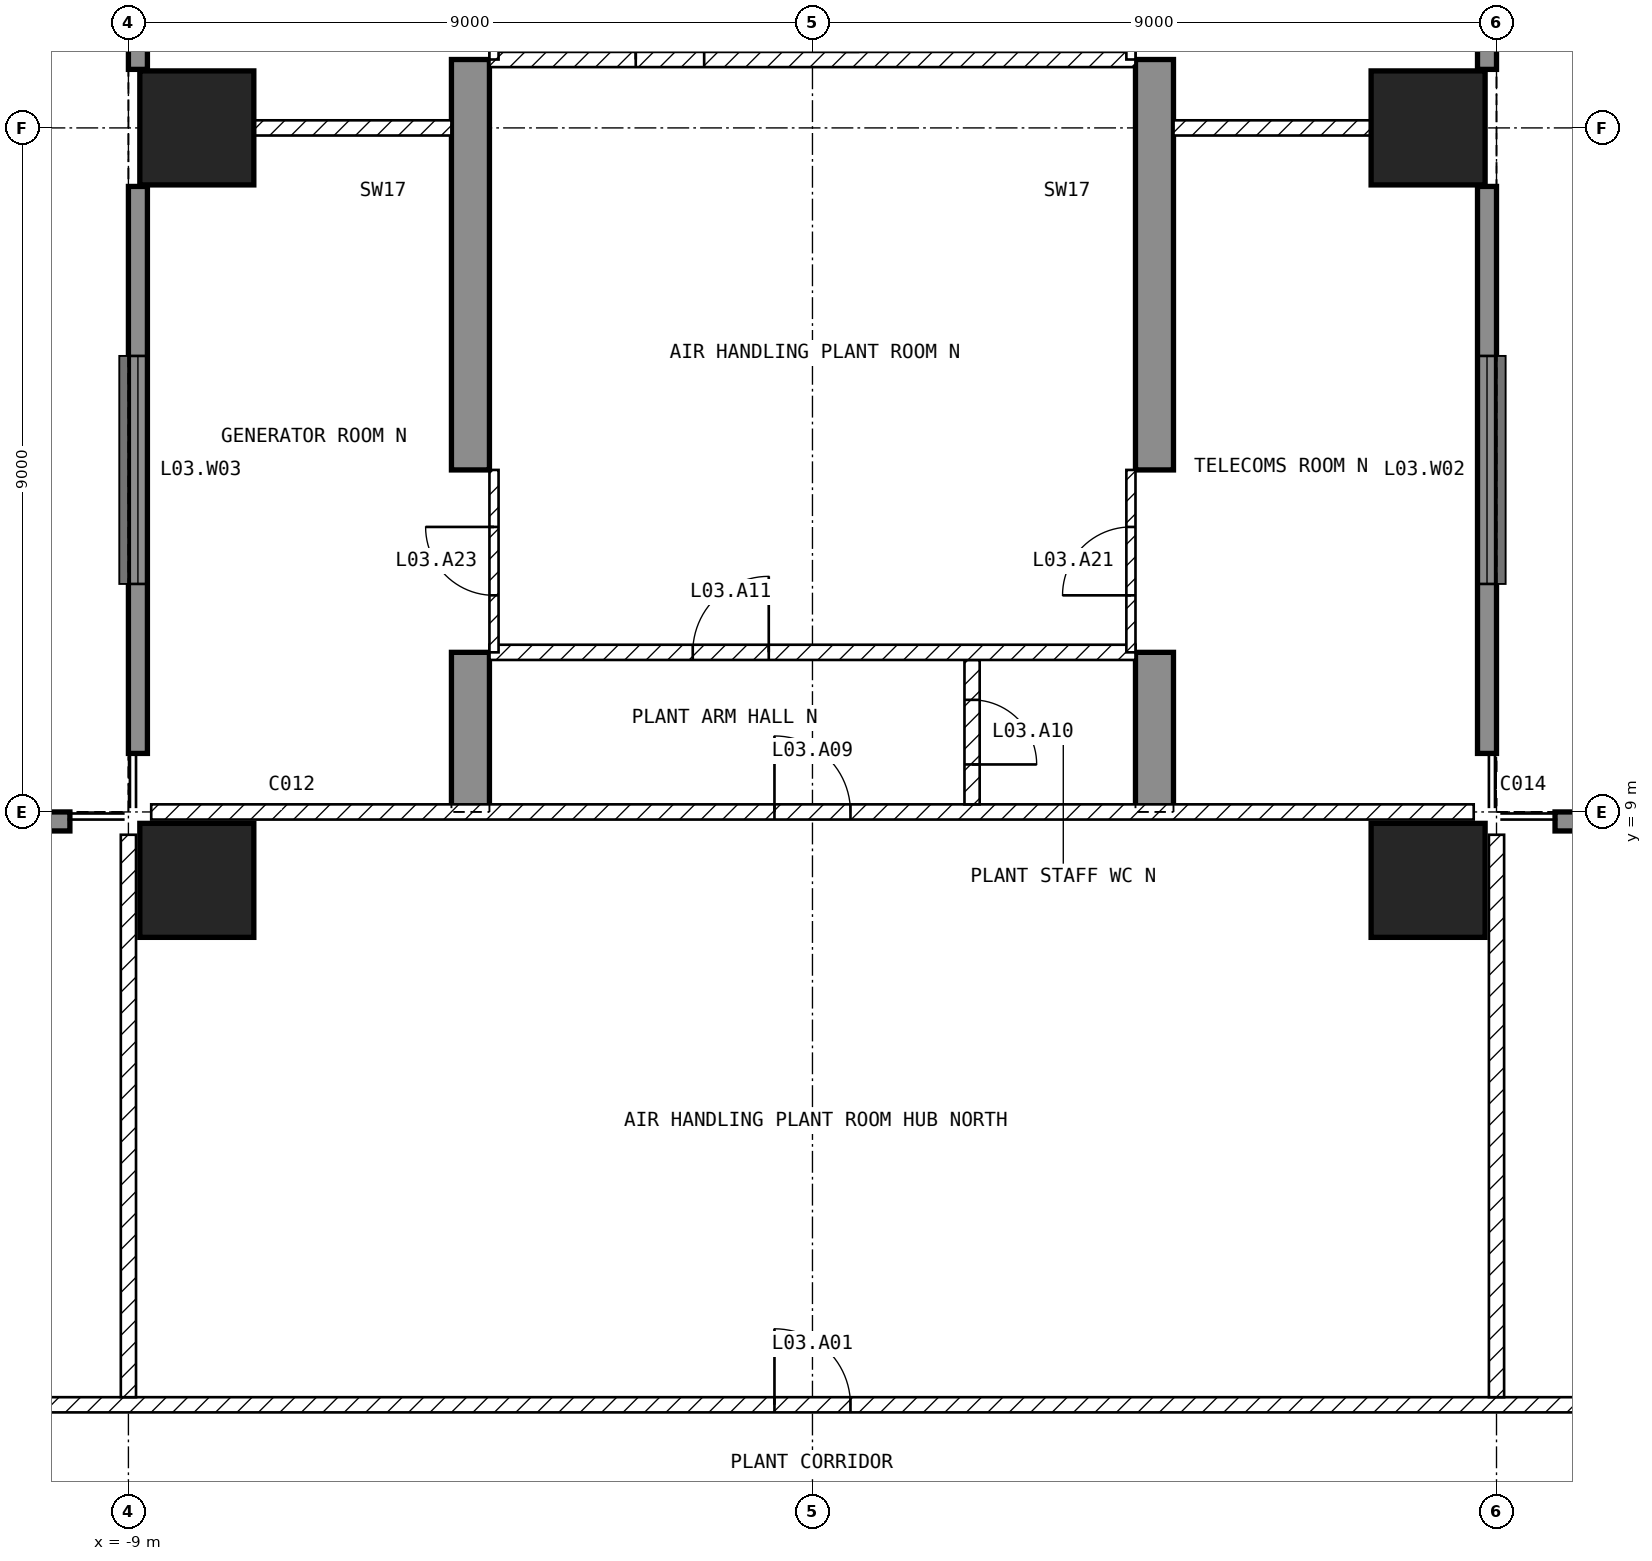
"""IFC4 building model, lengths in metres.
Left out: names, types, materials, properties, quantities, classifications, styles, units other than length and angle.
Written with IfcOpenShell. Run it as: python <this file> out.ifc"""

import sys

from ifc_helpers import new_model, si_unit, direction, frame, frame_2d, origin, origin_2d, place, context, subcontext, project, spatial, polyline, rectangle, outline, extrude, element, fill, save


model = new_model("IFC4")
c1 = context("Model", 3, precision=1e-05, world=origin(), true_north=direction((0.0, 1.0)))
c2 = subcontext(c1, "Body", "Model", "MODEL_VIEW")
j1 = project(units=[si_unit("LENGTHUNIT", "METRE"), si_unit("PLANEANGLEUNIT", "RADIAN")], contexts=[c1])
p1 = place(None, origin())
s1 = spatial("IfcSite", under=j1, at=p1, CompositionType="ELEMENT")
p2 = place(p1, origin())
s2 = spatial("IfcBuilding", under=s1, at=p2, CompositionType="ELEMENT")
p3 = place(p2, frame((0.0, 0.0, 27.0)))
s3 = spatial("IfcBuildingStorey", under=s2, at=p3, CompositionType="ELEMENT", Elevation=27.0)
for number, where, z_axis, x_axis in (
    (1, (-8.1, 8.1, -0.45), (0.0, 0.0, 1.0), (1.0, 0.0, 0.0)),
    (2, (-8.1, 18.0, -0.45), (0.0, 0.0, 1.0), (1.0, 0.0, 0.0)),
    (3, (8.1, 8.1, -0.45), (0.0, 0.0, 1.0), (1.0, 0.0, 0.0)),
    (4, (8.1, 18.0, -0.45), (0.0, 0.0, 1.0), (1.0, 0.0, 0.0)),
):
    element("IfcColumn", number, at=place(p3, frame(where, z_axis=z_axis, x_axis=x_axis)), inside=s3, PredefinedType="COLUMN", context=c2, shape_type="SweptSolid", body=[
        extrude(rectangle(XDim=1.5, YDim=1.5, at=origin_2d()), origin(), (0.0, 0.0, 1.0), 5.15),
    ])
for number, where, z_axis, x_axis in (
    (5, (-4.75, 9.0, -0.45), (1.0, 0.0, 0.0), (0.0, 1.0, 0.0)),
    (6, (4.25, 9.0, -0.45), (1.0, 0.0, 0.0), (0.0, 1.0, 0.0)),
):
    element("IfcWall", number, at=place(p3, frame(where, z_axis=z_axis, x_axis=x_axis)), inside=s3, PredefinedType="SHEAR", context=c2, shape_type="SweptSolid", body=[
        extrude(outline(polyline([(0.0, 0.0), (2.1, 0.0), (2.1, 2.85), (4.5, 2.85), (4.5, 0.0), (9.9, 0.0), (9.9, 2.85), (12.3, 2.85), (12.3, 0.0), (16.35, 0.0), (16.35, 5.15), (0.0, 5.15), (0.0, 0.0)])), origin(), (0.0, 0.0, 1.0), 0.5),
    ])
p4 = place(p3, frame((17.23, 8.875, 0.0), z_axis=(0.0, 0.0, 1.0), x_axis=(-1.0, 0.0, 0.0)))
e7 = element("IfcWall", 7, at=p4, inside=s3, PredefinedType="SOLIDWALL", context=c2, shape_type="SweptSolid", body=[
    extrude(rectangle(XDim=7.46, YDim=0.25, at=frame_2d((3.73, 0.0))), origin(), (0.0, 0.0, 1.0), 4.7),
])
p5 = place(p4, frame((2.23, 0.0, 1.0)))
e8 = element("IfcOpeningElement", 8, at=p5, cuts=e7, PredefinedType="OPENING", context=c2, shape_type="SweptSolid", body=[
    extrude(rectangle(XDim=3.0, YDim=2.4, at=frame_2d((1.5, 1.2))), frame((0.0, 0.135, 0.0), z_axis=(0.0, -1.0, 0.0), x_axis=(1.0, 0.0, 0.0)), (0.0, 0.0, 1.0), 0.27),
])
p6 = place(p3, frame((8.875, 9.77, 0.0), z_axis=(0.0, 0.0, 1.0), x_axis=(0.0, 1.0, 0.0)))
e9 = element("IfcWall", 9, at=p6, inside=s3, PredefinedType="SOLIDWALL", context=c2, shape_type="SweptSolid", body=[
    extrude(rectangle(XDim=7.46, YDim=0.25, at=frame_2d((3.73, 0.0))), origin(), (0.0, 0.0, 1.0), 4.7),
])
p7 = place(p6, frame((2.23, 0.0, 1.0)))
e10 = element("IfcOpeningElement", 10, at=p7, cuts=e9, PredefinedType="OPENING", context=c2, shape_type="SweptSolid", body=[
    extrude(rectangle(XDim=3.0, YDim=2.4, at=frame_2d((1.5, 1.2))), frame((0.0, 0.135, 0.0), z_axis=(0.0, -1.0, 0.0), x_axis=(1.0, 0.0, 0.0)), (0.0, 0.0, 1.0), 0.27),
])
for number, where, z_axis, x_axis in (
    (11, (8.875, 18.77, 0.0), (0.0, 0.0, 1.0), (0.0, 1.0, 0.0)),
    (12, (-8.875, 22.63, 0.0), (0.0, 0.0, 1.0), (0.0, -1.0, 0.0)),
):
    element("IfcWall", number, at=place(p3, frame(where, z_axis=z_axis, x_axis=x_axis)), inside=s3, PredefinedType="SOLIDWALL", context=c2, shape_type="SweptSolid", body=[
        extrude(rectangle(XDim=3.86, YDim=0.25, at=frame_2d((1.93, 0.0))), origin(), (0.0, 0.0, 1.0), 4.7),
    ])
p8 = place(p3, frame((-8.875, 17.23, 0.0), z_axis=(0.0, 0.0, 1.0), x_axis=(0.0, -1.0, 0.0)))
e13 = element("IfcWall", 13, at=p8, inside=s3, PredefinedType="SOLIDWALL", context=c2, shape_type="SweptSolid", body=[
    extrude(rectangle(XDim=7.46, YDim=0.25, at=frame_2d((3.73, 0.0))), origin(), (0.0, 0.0, 1.0), 4.7),
])
p9 = place(p8, frame((2.23, 0.0, 1.0)))
e14 = element("IfcOpeningElement", 14, at=p9, cuts=e13, PredefinedType="OPENING", context=c2, shape_type="SweptSolid", body=[
    extrude(rectangle(XDim=3.0, YDim=2.4, at=frame_2d((1.5, 1.2))), frame((0.0, 0.135, 0.0), z_axis=(0.0, -1.0, 0.0), x_axis=(1.0, 0.0, 0.0)), (0.0, 0.0, 1.0), 0.27),
])
p10 = place(p3, frame((-9.77, 8.875, 0.0), z_axis=(0.0, 0.0, 1.0), x_axis=(-1.0, 0.0, 0.0)))
e15 = element("IfcWall", 15, at=p10, inside=s3, PredefinedType="SOLIDWALL", context=c2, shape_type="SweptSolid", body=[
    extrude(rectangle(XDim=7.46, YDim=0.25, at=frame_2d((3.73, 0.0))), origin(), (0.0, 0.0, 1.0), 4.7),
])
p11 = place(p10, frame((2.23, 0.0, 1.0)))
e16 = element("IfcOpeningElement", 16, at=p11, cuts=e15, PredefinedType="OPENING", context=c2, shape_type="SweptSolid", body=[
    extrude(rectangle(XDim=3.0, YDim=2.4, at=frame_2d((1.5, 1.2))), frame((0.0, 0.135, 0.0), z_axis=(0.0, -1.0, 0.0), x_axis=(1.0, 0.0, 0.0)), (0.0, 0.0, 1.0), 0.27),
])
p12 = place(p3, frame((-21.6, 1.2, 0.0), z_axis=(0.0, 0.0, 1.0), x_axis=(1.0, 0.0, 0.0)))
e17 = element("IfcWall", 17, at=p12, inside=s3, PredefinedType="PARTITIONING", context=c2, shape_type="SweptSolid", body=[
    extrude(rectangle(XDim=43.2, YDim=0.2, at=frame_2d((21.6, 0.0))), origin(), (0.0, 0.0, 1.0), 4.7),
])
p13 = place(p12, frame((21.1, 0.0, 0.0)))
e18 = element("IfcOpeningElement", 18, at=p13, cuts=e17, PredefinedType="OPENING", context=c2, shape_type="SweptSolid", body=[
    extrude(rectangle(XDim=1.0, YDim=2.1, at=frame_2d((0.5, 1.05))), frame((0.0, 0.11, 0.0), z_axis=(0.0, -1.0, 0.0), x_axis=(1.0, 0.0, 0.0)), (0.0, 0.0, 1.0), 0.22),
])
p14 = place(p12, frame((36.4, 0.0, 0.0)))
e19 = element("IfcOpeningElement", 19, at=p14, cuts=e17, PredefinedType="OPENING", context=c2, shape_type="SweptSolid", body=[
    extrude(rectangle(XDim=1.0, YDim=2.1, at=frame_2d((0.5, 1.05))), frame((0.0, 0.11, 0.0), z_axis=(0.0, -1.0, 0.0), x_axis=(1.0, 0.0, 0.0)), (0.0, 0.0, 1.0), 0.22),
])
p15 = place(p12, frame((5.8, 0.0, 0.0)))
e20 = element("IfcOpeningElement", 20, at=p15, cuts=e17, PredefinedType="OPENING", context=c2, shape_type="SweptSolid", body=[
    extrude(rectangle(XDim=1.0, YDim=2.1, at=frame_2d((0.5, 1.05))), frame((0.0, 0.11, 0.0), z_axis=(0.0, -1.0, 0.0), x_axis=(1.0, 0.0, 0.0)), (0.0, 0.0, 1.0), 0.22),
])
for number, where, z_axis, x_axis in (
    (21, (9.0, 8.7, 0.0), (0.0, 0.0, 1.0), (0.0, -1.0, 0.0)),
    (22, (-9.0, 1.3, 0.0), (0.0, 0.0, 1.0), (0.0, 1.0, 0.0)),
):
    element("IfcWall", number, at=place(p3, frame(where, z_axis=z_axis, x_axis=x_axis)), inside=s3, PredefinedType="PARTITIONING", context=c2, shape_type="SweptSolid", body=[
        extrude(rectangle(XDim=7.4, YDim=0.2, at=frame_2d((3.7, 0.0))), origin(), (0.0, 0.0, 1.0), 4.7),
    ])
p16 = place(p3, frame((-8.7, 9.0, 0.0), z_axis=(0.0, 0.0, 1.0), x_axis=(1.0, 0.0, 0.0)))
e23 = element("IfcWall", 23, at=p16, inside=s3, PredefinedType="PARTITIONING", context=c2, shape_type="SweptSolid", body=[
    extrude(rectangle(XDim=17.4, YDim=0.2, at=frame_2d((8.7, 0.0))), origin(), (0.0, 0.0, 1.0), 4.7),
])
p17 = place(p16, frame((8.2, 0.0, 0.0)))
e24 = element("IfcOpeningElement", 24, at=p17, cuts=e23, PredefinedType="OPENING", context=c2, shape_type="SweptSolid", body=[
    extrude(rectangle(XDim=1.0, YDim=2.1, at=frame_2d((0.5, 1.05))), frame((0.0, 0.11, 0.0), z_axis=(0.0, -1.0, 0.0), x_axis=(1.0, 0.0, 0.0)), (0.0, 0.0, 1.0), 0.22),
])
p18 = place(p3, frame((2.1, 11.0, 0.0), z_axis=(0.0, 0.0, 1.0), x_axis=(0.0, -1.0, 0.0)))
e25 = element("IfcWall", 25, at=p18, inside=s3, PredefinedType="PARTITIONING", context=c2, shape_type="SweptSolid", body=[
    extrude(rectangle(XDim=1.9, YDim=0.2, at=frame_2d((0.95, 0.0))), origin(), (0.0, 0.0, 1.0), 4.7),
])
p19 = place(p18, frame((0.525, 0.0, 0.0)))
e26 = element("IfcOpeningElement", 26, at=p19, cuts=e25, PredefinedType="OPENING", context=c2, shape_type="SweptSolid", body=[
    extrude(rectangle(XDim=0.85, YDim=2.1, at=frame_2d((0.425, 1.05))), frame((0.0, 0.11, 0.0), z_axis=(0.0, -1.0, 0.0), x_axis=(1.0, 0.0, 0.0)), (0.0, 0.0, 1.0), 0.22),
])
p20 = place(p3, frame((-4.25, 11.1, 0.0), z_axis=(0.0, 0.0, 1.0), x_axis=(1.0, 0.0, 0.0)))
e27 = element("IfcWall", 27, at=p20, inside=s3, PredefinedType="PARTITIONING", context=c2, shape_type="SweptSolid", body=[
    extrude(rectangle(XDim=8.5, YDim=0.2, at=frame_2d((4.25, 0.0))), origin(), (0.0, 0.0, 1.0), 4.7),
])
p21 = place(p20, frame((2.675, 0.0, 0.0)))
e28 = element("IfcOpeningElement", 28, at=p21, cuts=e27, PredefinedType="OPENING", context=c2, shape_type="SweptSolid", body=[
    extrude(rectangle(XDim=1.0, YDim=2.1, at=frame_2d((0.5, 1.05))), frame((0.0, 0.11, 0.0), z_axis=(0.0, -1.0, 0.0), x_axis=(1.0, 0.0, 0.0)), (0.0, 0.0, 1.0), 0.22),
])
p22 = place(p3, frame((-4.25, 18.9, 0.0), z_axis=(0.0, 0.0, 1.0), x_axis=(1.0, 0.0, 0.0)))
e29 = element("IfcWall", 29, at=p22, inside=s3, PredefinedType="PARTITIONING", context=c2, shape_type="SweptSolid", body=[
    extrude(rectangle(XDim=8.5, YDim=0.2, at=frame_2d((4.25, 0.0))), origin(), (0.0, 0.0, 1.0), 4.7),
])
p23 = place(p22, frame((1.925, 0.0, 0.0)))
e30 = element("IfcOpeningElement", 30, at=p23, cuts=e29, PredefinedType="OPENING", context=c2, shape_type="SweptSolid", body=[
    extrude(rectangle(XDim=0.9, YDim=2.1, at=frame_2d((0.45, 1.05))), frame((0.0, 0.11, 0.0), z_axis=(0.0, -1.0, 0.0), x_axis=(1.0, 0.0, 0.0)), (0.0, 0.0, 1.0), 0.22),
])
for number, where, z_axis, x_axis in (
    (31, (4.75, 18.0, 0.0), (0.0, 0.0, 1.0), (1.0, 0.0, 0.0)),
    (32, (-7.35, 18.0, 0.0), (0.0, 0.0, 1.0), (1.0, 0.0, 0.0)),
):
    element("IfcWall", number, at=place(p3, frame(where, z_axis=z_axis, x_axis=x_axis)), inside=s3, PredefinedType="PARTITIONING", context=c2, shape_type="SweptSolid", body=[
        extrude(rectangle(XDim=2.6, YDim=0.2, at=frame_2d((1.3, 0.0))), origin(), (0.0, 0.0, 1.0), 3.72),
    ])
p24 = place(p3, frame((4.19, 11.1, 0.0), z_axis=(0.0, 0.0, 1.0), x_axis=(0.0, 1.0, 0.0)))
e33 = element("IfcWall", 33, at=p24, inside=s3, PredefinedType="PARTITIONING", context=c2, shape_type="SweptSolid", body=[
    extrude(rectangle(XDim=2.4, YDim=0.12, at=frame_2d((1.2, 0.0))), origin(), (0.0, 0.0, 1.0), 2.4),
])
p25 = place(p24, frame((0.75, 0.0, 0.0)))
e34 = element("IfcOpeningElement", 34, at=p25, cuts=e33, PredefinedType="OPENING", context=c2, shape_type="SweptSolid", body=[
    extrude(rectangle(XDim=0.9, YDim=2.1, at=frame_2d((0.45, 1.05))), frame((0.0, 0.07, 0.0), z_axis=(0.0, -1.0, 0.0), x_axis=(1.0, 0.0, 0.0)), (0.0, 0.0, 1.0), 0.14),
])
p26 = place(p3, frame((4.19, 18.9, 0.0), z_axis=(0.0, 0.0, 1.0), x_axis=(0.0, 1.0, 0.0)))
e35 = element("IfcWall", 35, at=p26, inside=s3, PredefinedType="PARTITIONING", context=c2, shape_type="SweptSolid", body=[
    extrude(rectangle(XDim=2.4, YDim=0.12, at=frame_2d((1.2, 0.0))), origin(), (0.0, 0.0, 1.0), 2.4),
])
p27 = place(p26, frame((0.75, 0.0, 0.0)))
e36 = element("IfcOpeningElement", 36, at=p27, cuts=e35, PredefinedType="OPENING", context=c2, shape_type="SweptSolid", body=[
    extrude(rectangle(XDim=0.9, YDim=2.1, at=frame_2d((0.45, 1.05))), frame((0.0, 0.07, 0.0), z_axis=(0.0, -1.0, 0.0), x_axis=(1.0, 0.0, 0.0)), (0.0, 0.0, 1.0), 0.14),
])
p28 = place(p3, frame((-4.19, 11.1, 0.0), z_axis=(0.0, 0.0, 1.0), x_axis=(0.0, 1.0, 0.0)))
e37 = element("IfcWall", 37, at=p28, inside=s3, PredefinedType="PARTITIONING", context=c2, shape_type="SweptSolid", body=[
    extrude(rectangle(XDim=2.4, YDim=0.12, at=frame_2d((1.2, 0.0))), origin(), (0.0, 0.0, 1.0), 2.4),
])
p29 = place(p28, frame((0.75, 0.0, 0.0)))
e38 = element("IfcOpeningElement", 38, at=p29, cuts=e37, PredefinedType="OPENING", context=c2, shape_type="SweptSolid", body=[
    extrude(rectangle(XDim=0.9, YDim=2.1, at=frame_2d((0.45, 1.05))), frame((0.0, 0.07, 0.0), z_axis=(0.0, -1.0, 0.0), x_axis=(1.0, 0.0, 0.0)), (0.0, 0.0, 1.0), 0.14),
])
p30 = place(p3, frame((-4.19, 18.9, 0.0), z_axis=(0.0, 0.0, 1.0), x_axis=(0.0, 1.0, 0.0)))
e39 = element("IfcWall", 39, at=p30, inside=s3, PredefinedType="PARTITIONING", context=c2, shape_type="SweptSolid", body=[
    extrude(rectangle(XDim=2.4, YDim=0.12, at=frame_2d((1.2, 0.0))), origin(), (0.0, 0.0, 1.0), 2.4),
])
p31 = place(p30, frame((0.75, 0.0, 0.0)))
e40 = element("IfcOpeningElement", 40, at=p31, cuts=e39, PredefinedType="OPENING", context=c2, shape_type="SweptSolid", body=[
    extrude(rectangle(XDim=0.9, YDim=2.1, at=frame_2d((0.45, 1.05))), frame((0.0, 0.07, 0.0), z_axis=(0.0, -1.0, 0.0), x_axis=(1.0, 0.0, 0.0)), (0.0, 0.0, 1.0), 0.14),
])
p32 = place(p7, origin())
e41 = element("IfcWindow", 41, at=p32, inside=s3, PartitioningType="SINGLE_PANEL", PredefinedType="WINDOW", context=c2, shape_type="SweptSolid", body=[
    extrude(rectangle(XDim=3.0, YDim=2.4, at=frame_2d((1.5, 1.2))), frame((0.0, 0.03, 0.0), z_axis=(0.0, -1.0, 0.0), x_axis=(1.0, 0.0, 0.0)), (0.0, 0.0, 1.0), 0.06),
])
fill(e10, e41)
p33 = place(p9, origin())
e42 = element("IfcWindow", 42, at=p33, inside=s3, PartitioningType="SINGLE_PANEL", PredefinedType="WINDOW", context=c2, shape_type="SweptSolid", body=[
    extrude(rectangle(XDim=3.0, YDim=2.4, at=frame_2d((1.5, 1.2))), frame((0.0, 0.03, 0.0), z_axis=(0.0, -1.0, 0.0), x_axis=(1.0, 0.0, 0.0)), (0.0, 0.0, 1.0), 0.06),
])
fill(e14, e42)
p34 = place(p13, origin())
e43 = element("IfcDoor", 43, at=p34, inside=s3, OperationType="SINGLE_SWING_LEFT", PredefinedType="DOOR", context=c2, shape_type="SweptSolid", body=[
    extrude(rectangle(XDim=1.0, YDim=2.1, at=frame_2d((0.5, 1.05))), frame((0.0, 0.025, 0.0), z_axis=(0.0, -1.0, 0.0), x_axis=(1.0, 0.0, 0.0)), (0.0, 0.0, 1.0), 0.05),
])
fill(e18, e43)
p35 = place(p17, origin())
e44 = element("IfcDoor", 44, at=p35, inside=s3, OperationType="SINGLE_SWING_LEFT", PredefinedType="DOOR", context=c2, shape_type="SweptSolid", body=[
    extrude(rectangle(XDim=1.0, YDim=2.1, at=frame_2d((0.5, 1.05))), frame((0.0, 0.025, 0.0), z_axis=(0.0, -1.0, 0.0), x_axis=(1.0, 0.0, 0.0)), (0.0, 0.0, 1.0), 0.05),
])
fill(e24, e44)
p36 = place(p19, origin())
e45 = element("IfcDoor", 45, at=p36, inside=s3, OperationType="SINGLE_SWING_RIGHT", PredefinedType="DOOR", context=c2, shape_type="SweptSolid", body=[
    extrude(rectangle(XDim=0.85, YDim=2.1, at=frame_2d((0.425, 1.05))), frame((0.0, 0.025, 0.0), z_axis=(0.0, -1.0, 0.0), x_axis=(1.0, 0.0, 0.0)), (0.0, 0.0, 1.0), 0.05),
])
fill(e26, e45)
p37 = place(p21, origin())
e46 = element("IfcDoor", 46, at=p37, inside=s3, OperationType="SINGLE_SWING_RIGHT", PredefinedType="DOOR", context=c2, shape_type="SweptSolid", body=[
    extrude(rectangle(XDim=1.0, YDim=2.1, at=frame_2d((0.5, 1.05))), frame((0.0, 0.025, 0.0), z_axis=(0.0, -1.0, 0.0), x_axis=(1.0, 0.0, 0.0)), (0.0, 0.0, 1.0), 0.05),
])
fill(e28, e46)
p38 = place(p23, origin())
e47 = element("IfcDoor", 47, at=p38, inside=s3, OperationType="SINGLE_SWING_LEFT", PredefinedType="DOOR", context=c2, shape_type="SweptSolid", body=[
    extrude(rectangle(XDim=0.9, YDim=2.1, at=frame_2d((0.45, 1.05))), frame((0.0, 0.025, 0.0), z_axis=(0.0, -1.0, 0.0), x_axis=(1.0, 0.0, 0.0)), (0.0, 0.0, 1.0), 0.05),
])
fill(e30, e47)
p39 = place(p25, origin())
e48 = element("IfcDoor", 48, at=p39, inside=s3, OperationType="SINGLE_SWING_LEFT", PredefinedType="DOOR", context=c2, shape_type="SweptSolid", body=[
    extrude(rectangle(XDim=0.9, YDim=2.1, at=frame_2d((0.45, 1.05))), frame((0.0, 0.025, 0.0), z_axis=(0.0, -1.0, 0.0), x_axis=(1.0, 0.0, 0.0)), (0.0, 0.0, 1.0), 0.05),
])
fill(e34, e48)
p40 = place(p29, origin())
e49 = element("IfcDoor", 49, at=p40, inside=s3, OperationType="SINGLE_SWING_RIGHT", PredefinedType="DOOR", context=c2, shape_type="SweptSolid", body=[
    extrude(rectangle(XDim=0.9, YDim=2.1, at=frame_2d((0.45, 1.05))), frame((0.0, 0.025, 0.0), z_axis=(0.0, -1.0, 0.0), x_axis=(1.0, 0.0, 0.0)), (0.0, 0.0, 1.0), 0.05),
])
fill(e38, e49)
save(model, sys.argv[1])
